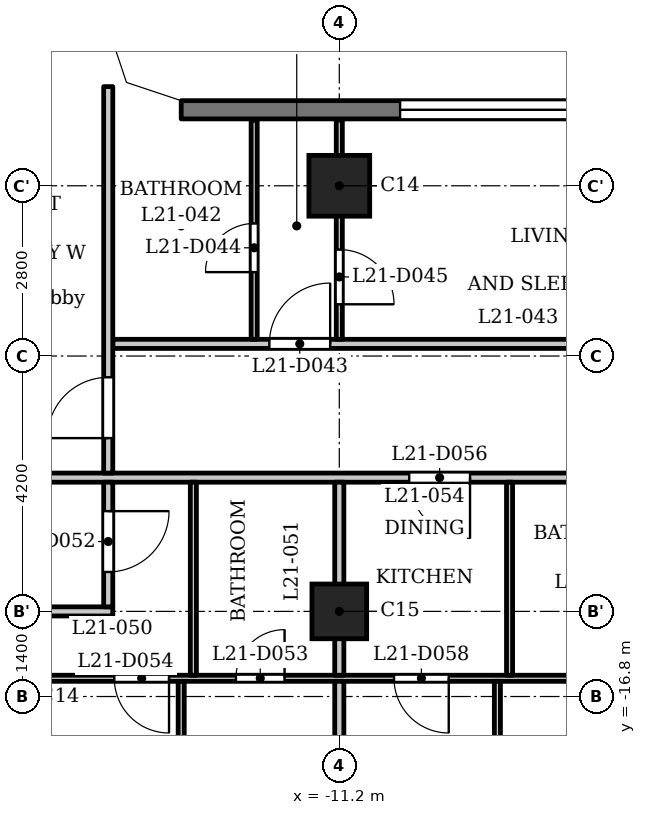
"""IFC4 building model, lengths in metres.
Left out: names, types, materials, properties, quantities, classifications, styles, units other than length and angle.
Written with IfcOpenShell. Run it as: python <this file> out.ifc"""

import sys

from ifc_helpers import new_model, si_unit, direction, frame, frame_2d, origin, origin_2d, place, context, subcontext, project, spatial, polyline, rectangle, outline, extrude, element, fill, save


model = new_model("IFC4")
c1 = context("Model", 3, precision=1e-05, world=origin(), true_north=direction((0.0, 1.0)))
c2 = subcontext(c1, "Body", "Model", "MODEL_VIEW")
j1 = project(units=[si_unit("LENGTHUNIT", "METRE"), si_unit("PLANEANGLEUNIT", "RADIAN")], contexts=[c1])
p1 = place(None, origin())
s1 = spatial("IfcSite", under=j1, at=p1, CompositionType="ELEMENT")
p2 = place(p1, origin())
s2 = spatial("IfcBuilding", under=s1, at=p2, CompositionType="ELEMENT")
p3 = place(p2, frame((0.0, 0.0, 86.8)))
s3 = spatial("IfcBuildingStorey", under=s2, at=p3, CompositionType="ELEMENT", Elevation=86.8)
p4 = place(p3, frame((-11.2, -8.4, 0.0), z_axis=(0.0, 0.0, 1.0), x_axis=(1.0, 0.0, 0.0)))
e1 = element("IfcColumn", 1, at=p4, inside=s3, PredefinedType="COLUMN", context=c2, shape_type="SweptSolid", body=[
    extrude(rectangle(XDim=1.0, YDim=1.0, at=origin_2d()), origin(), (0.0, 0.0, 1.0), 3.5),
])
p5 = place(p3, frame((-11.2, -15.4, 0.0), z_axis=(0.0, 0.0, 1.0), x_axis=(1.0, 0.0, 0.0)))
e2 = element("IfcColumn", 2, at=p5, inside=s3, PredefinedType="COLUMN", context=c2, shape_type="SweptSolid", body=[
    extrude(rectangle(XDim=0.9, YDim=0.9, at=origin_2d()), origin(), (0.0, 0.0, 1.0), 3.5),
])
p6 = place(p3, frame((13.8, -7.15, 0.0), z_axis=(0.0, 0.0, 1.0), x_axis=(-1.0, 0.0, 0.0)))
e3 = element("IfcWall", 3, at=p6, inside=s3, PredefinedType="SOLIDWALL", context=c2, shape_type="SweptSolid", body=[
    extrude(rectangle(XDim=27.6, YDim=0.3, at=frame_2d((13.8, 0.0))), origin(), (0.0, 0.0, 1.0), 3.2),
])
p7 = place(p6, frame((3.6, 0.0, 1.2)))
e4 = element("IfcOpeningElement", 4, at=p7, cuts=e3, PredefinedType="OPENING", context=c2, shape_type="SweptSolid", body=[
    extrude(rectangle(XDim=3.6, YDim=0.95, at=frame_2d((1.8, 0.475))), frame((0.0, 0.16, 0.0), z_axis=(0.0, -1.0, 0.0), x_axis=(1.0, 0.0, 0.0)), (0.0, 0.0, 1.0), 0.32),
])
p8 = place(p6, frame((8.8, 0.0, 0.6)))
e5 = element("IfcOpeningElement", 5, at=p8, cuts=e3, PredefinedType="OPENING", context=c2, shape_type="SweptSolid", body=[
    extrude(rectangle(XDim=1.2, YDim=1.55, at=frame_2d((0.6, 0.775))), frame((0.0, 0.16, 0.0), z_axis=(0.0, -1.0, 0.0), x_axis=(1.0, 0.0, 0.0)), (0.0, 0.0, 1.0), 0.32),
])
p9 = place(p6, frame((11.3, 0.0, 0.9)))
e6 = element("IfcOpeningElement", 6, at=p9, cuts=e3, PredefinedType="OPENING", context=c2, shape_type="SweptSolid", body=[
    extrude(rectangle(XDim=1.8, YDim=1.25, at=frame_2d((0.9, 0.625))), frame((0.0, 0.16, 0.0), z_axis=(0.0, -1.0, 0.0), x_axis=(1.0, 0.0, 0.0)), (0.0, 0.0, 1.0), 0.32),
])
p10 = place(p6, frame((14.8, 0.0, 1.2)))
e7 = element("IfcOpeningElement", 7, at=p10, cuts=e3, PredefinedType="OPENING", context=c2, shape_type="SweptSolid", body=[
    extrude(rectangle(XDim=3.6, YDim=0.95, at=frame_2d((1.8, 0.475))), frame((0.0, 0.16, 0.0), z_axis=(0.0, -1.0, 0.0), x_axis=(1.0, 0.0, 0.0)), (0.0, 0.0, 1.0), 0.32),
])
p11 = place(p6, frame((20.4, 0.0, 1.2)))
e8 = element("IfcOpeningElement", 8, at=p11, cuts=e3, PredefinedType="OPENING", context=c2, shape_type="SweptSolid", body=[
    extrude(rectangle(XDim=3.6, YDim=0.95, at=frame_2d((1.8, 0.475))), frame((0.0, 0.16, 0.0), z_axis=(0.0, -1.0, 0.0), x_axis=(1.0, 0.0, 0.0)), (0.0, 0.0, 1.0), 0.32),
])
p12 = place(p3, frame((-16.725, -16.5, 0.0), z_axis=(0.0, 0.0, 1.0), x_axis=(1.0, 0.0, 0.0)))
e9 = element("IfcWall", 9, at=p12, inside=s3, PredefinedType="PARTITIONING", context=c2, shape_type="SweptSolid", body=[
    extrude(rectangle(XDim=33.45, YDim=0.1, at=frame_2d((16.725, 0.0))), origin(), (0.0, 0.0, 1.0), 3.2),
])
p13 = place(p12, frame((3.825, 0.0, 0.0)))
e10 = element("IfcOpeningElement", 10, at=p13, cuts=e9, PredefinedType="OPENING", context=c2, shape_type="SweptSolid", body=[
    extrude(rectangle(XDim=0.8, YDim=2.1, at=frame_2d((0.4, 1.05))), frame((0.0, 0.06, 0.0), z_axis=(0.0, -1.0, 0.0), x_axis=(1.0, 0.0, 0.0)), (0.0, 0.0, 1.0), 0.12),
])
p14 = place(p12, frame((1.825, 0.0, 0.0)))
e11 = element("IfcOpeningElement", 11, at=p14, cuts=e9, PredefinedType="OPENING", context=c2, shape_type="SweptSolid", body=[
    extrude(rectangle(XDim=0.9, YDim=2.1, at=frame_2d((0.45, 1.05))), frame((0.0, 0.06, 0.0), z_axis=(0.0, -1.0, 0.0), x_axis=(1.0, 0.0, 0.0)), (0.0, 0.0, 1.0), 0.12),
])
p15 = place(p12, frame((9.675, 0.0, 0.0)))
e12 = element("IfcOpeningElement", 12, at=p15, cuts=e9, PredefinedType="OPENING", context=c2, shape_type="SweptSolid", body=[
    extrude(rectangle(XDim=0.8, YDim=2.1, at=frame_2d((0.4, 1.05))), frame((0.0, 0.06, 0.0), z_axis=(0.0, -1.0, 0.0), x_axis=(1.0, 0.0, 0.0)), (0.0, 0.0, 1.0), 0.12),
])
p16 = place(p12, frame((6.425, 0.0, 0.0)))
e13 = element("IfcOpeningElement", 13, at=p16, cuts=e9, PredefinedType="OPENING", context=c2, shape_type="SweptSolid", body=[
    extrude(rectangle(XDim=0.9, YDim=2.1, at=frame_2d((0.45, 1.05))), frame((0.0, 0.06, 0.0), z_axis=(0.0, -1.0, 0.0), x_axis=(1.0, 0.0, 0.0)), (0.0, 0.0, 1.0), 0.12),
])
p17 = place(p12, frame((15.275, 0.0, 0.0)))
e14 = element("IfcOpeningElement", 14, at=p17, cuts=e9, PredefinedType="OPENING", context=c2, shape_type="SweptSolid", body=[
    extrude(rectangle(XDim=0.8, YDim=2.1, at=frame_2d((0.4, 1.05))), frame((0.0, 0.06, 0.0), z_axis=(0.0, -1.0, 0.0), x_axis=(1.0, 0.0, 0.0)), (0.0, 0.0, 1.0), 0.12),
])
p18 = place(p12, frame((12.025, 0.0, 0.0)))
e15 = element("IfcOpeningElement", 15, at=p18, cuts=e9, PredefinedType="OPENING", context=c2, shape_type="SweptSolid", body=[
    extrude(rectangle(XDim=0.9, YDim=2.1, at=frame_2d((0.45, 1.05))), frame((0.0, 0.06, 0.0), z_axis=(0.0, -1.0, 0.0), x_axis=(1.0, 0.0, 0.0)), (0.0, 0.0, 1.0), 0.12),
])
p19 = place(p12, frame((20.875, 0.0, 0.0)))
e16 = element("IfcOpeningElement", 16, at=p19, cuts=e9, PredefinedType="OPENING", context=c2, shape_type="SweptSolid", body=[
    extrude(rectangle(XDim=0.8, YDim=2.1, at=frame_2d((0.4, 1.05))), frame((0.0, 0.06, 0.0), z_axis=(0.0, -1.0, 0.0), x_axis=(1.0, 0.0, 0.0)), (0.0, 0.0, 1.0), 0.12),
])
p20 = place(p12, frame((18.625, 0.0, 0.0)))
e17 = element("IfcOpeningElement", 17, at=p20, cuts=e9, PredefinedType="OPENING", context=c2, shape_type="SweptSolid", body=[
    extrude(rectangle(XDim=0.9, YDim=2.1, at=frame_2d((0.45, 1.05))), frame((0.0, 0.06, 0.0), z_axis=(0.0, -1.0, 0.0), x_axis=(1.0, 0.0, 0.0)), (0.0, 0.0, 1.0), 0.12),
])
p21 = place(p12, frame((23.875, 0.0, 0.0)))
e18 = element("IfcOpeningElement", 18, at=p21, cuts=e9, PredefinedType="OPENING", context=c2, shape_type="SweptSolid", body=[
    extrude(rectangle(XDim=0.8, YDim=2.1, at=frame_2d((0.4, 1.05))), frame((0.0, 0.06, 0.0), z_axis=(0.0, -1.0, 0.0), x_axis=(1.0, 0.0, 0.0)), (0.0, 0.0, 1.0), 0.12),
])
p22 = place(p12, frame((26.225, 0.0, 0.0)))
e19 = element("IfcOpeningElement", 19, at=p22, cuts=e9, PredefinedType="OPENING", context=c2, shape_type="SweptSolid", body=[
    extrude(rectangle(XDim=0.9, YDim=2.1, at=frame_2d((0.45, 1.05))), frame((0.0, 0.06, 0.0), z_axis=(0.0, -1.0, 0.0), x_axis=(1.0, 0.0, 0.0)), (0.0, 0.0, 1.0), 0.12),
])
p23 = place(p12, frame((28.575, 0.0, 0.0)))
e20 = element("IfcOpeningElement", 20, at=p23, cuts=e9, PredefinedType="OPENING", context=c2, shape_type="SweptSolid", body=[
    extrude(rectangle(XDim=0.9, YDim=2.1, at=frame_2d((0.45, 1.05))), frame((0.0, 0.06, 0.0), z_axis=(0.0, -1.0, 0.0), x_axis=(1.0, 0.0, 0.0)), (0.0, 0.0, 1.0), 0.12),
])
p24 = place(p12, frame((30.675, 0.0, 0.0)))
e21 = element("IfcOpeningElement", 21, at=p24, cuts=e9, PredefinedType="OPENING", context=c2, shape_type="SweptSolid", body=[
    extrude(rectangle(XDim=0.9, YDim=2.1, at=frame_2d((0.45, 1.05))), frame((0.0, 0.06, 0.0), z_axis=(0.0, -1.0, 0.0), x_axis=(1.0, 0.0, 0.0)), (0.0, 0.0, 1.0), 0.12),
])
p25 = place(p3, frame((-27.484, -15.4, 0.0), z_axis=(0.0, 0.0, 1.0), x_axis=(1.0, 0.0, 0.0)))
e22 = element("IfcWall", 22, at=p25, inside=s3, PredefinedType="PARTITIONING", context=c2, shape_type="SweptSolid", body=[
    extrude(rectangle(XDim=12.559, YDim=0.15, at=frame_2d((6.279, 0.0))), origin(), (0.0, 0.0, 1.0), 3.2),
])
p26 = place(p25, frame((5.734, 0.0, 0.0)))
e23 = element("IfcOpeningElement", 23, at=p26, cuts=e22, PredefinedType="OPENING", context=c2, shape_type="SweptSolid", body=[
    extrude(rectangle(XDim=1.0, YDim=2.1, at=frame_2d((0.5, 1.05))), frame((0.0, 0.085, 0.0), z_axis=(0.0, -1.0, 0.0), x_axis=(1.0, 0.0, 0.0)), (0.0, 0.0, 1.0), 0.17),
])
p27 = place(p3, frame((-17.4, -13.2, 0.0), z_axis=(0.0, 0.0, 1.0), x_axis=(1.0, 0.0, 0.0)))
e24 = element("IfcWall", 24, at=p27, inside=s3, PredefinedType="PARTITIONING", context=c2, shape_type="SweptSolid", body=[
    extrude(rectangle(XDim=34.8, YDim=0.15, at=frame_2d((17.4, 0.0))), origin(), (0.0, 0.0, 1.0), 3.2),
])
p28 = place(p27, frame((0.15, 0.0, 0.0)))
e25 = element("IfcOpeningElement", 25, at=p28, cuts=e24, PredefinedType="OPENING", context=c2, shape_type="SweptSolid", body=[
    extrude(rectangle(XDim=1.0, YDim=2.1, at=frame_2d((0.5, 1.05))), frame((0.0, 0.085, 0.0), z_axis=(0.0, -1.0, 0.0), x_axis=(1.0, 0.0, 0.0)), (0.0, 0.0, 1.0), 0.17),
])
p29 = place(p27, frame((33.55, 0.0, 0.0)))
e26 = element("IfcOpeningElement", 26, at=p29, cuts=e24, PredefinedType="OPENING", context=c2, shape_type="SweptSolid", body=[
    extrude(rectangle(XDim=1.0, YDim=2.1, at=frame_2d((0.5, 1.05))), frame((0.0, 0.085, 0.0), z_axis=(0.0, -1.0, 0.0), x_axis=(1.0, 0.0, 0.0)), (0.0, 0.0, 1.0), 0.17),
])
p30 = place(p27, frame((7.35, 0.0, 0.0)))
e27 = element("IfcOpeningElement", 27, at=p30, cuts=e24, PredefinedType="OPENING", context=c2, shape_type="SweptSolid", body=[
    extrude(rectangle(XDim=1.0, YDim=2.1, at=frame_2d((0.5, 1.05))), frame((0.0, 0.085, 0.0), z_axis=(0.0, -1.0, 0.0), x_axis=(1.0, 0.0, 0.0)), (0.0, 0.0, 1.0), 0.17),
])
p31 = place(p27, frame((13.7, 0.0, 0.0)))
e28 = element("IfcOpeningElement", 28, at=p31, cuts=e24, PredefinedType="OPENING", context=c2, shape_type="SweptSolid", body=[
    extrude(rectangle(XDim=1.0, YDim=2.1, at=frame_2d((0.5, 1.05))), frame((0.0, 0.085, 0.0), z_axis=(0.0, -1.0, 0.0), x_axis=(1.0, 0.0, 0.0)), (0.0, 0.0, 1.0), 0.17),
])
p32 = place(p27, frame((19.3, 0.0, 0.0)))
e29 = element("IfcOpeningElement", 29, at=p32, cuts=e24, PredefinedType="OPENING", context=c2, shape_type="SweptSolid", body=[
    extrude(rectangle(XDim=1.0, YDim=2.1, at=frame_2d((0.5, 1.05))), frame((0.0, 0.085, 0.0), z_axis=(0.0, -1.0, 0.0), x_axis=(1.0, 0.0, 0.0)), (0.0, 0.0, 1.0), 0.17),
])
p33 = place(p3, frame((-14.925, -11.0, 0.0), z_axis=(0.0, 0.0, 1.0), x_axis=(1.0, 0.0, 0.0)))
e30 = element("IfcWall", 30, at=p33, inside=s3, PredefinedType="PARTITIONING", context=c2, shape_type="SweptSolid", body=[
    extrude(rectangle(XDim=29.85, YDim=0.15, at=frame_2d((14.925, 0.0))), origin(), (0.0, 0.0, 1.0), 3.2),
])
p34 = place(p33, frame((2.575, 0.0, 0.0)))
e31 = element("IfcOpeningElement", 31, at=p34, cuts=e30, PredefinedType="OPENING", context=c2, shape_type="SweptSolid", body=[
    extrude(rectangle(XDim=1.0, YDim=2.1, at=frame_2d((0.5, 1.05))), frame((0.0, 0.085, 0.0), z_axis=(0.0, -1.0, 0.0), x_axis=(1.0, 0.0, 0.0)), (0.0, 0.0, 1.0), 0.17),
])
p35 = place(p33, frame((15.475, 0.0, 0.0)))
e32 = element("IfcOpeningElement", 32, at=p35, cuts=e30, PredefinedType="OPENING", context=c2, shape_type="SweptSolid", body=[
    extrude(rectangle(XDim=1.0, YDim=2.1, at=frame_2d((0.5, 1.05))), frame((0.0, 0.085, 0.0), z_axis=(0.0, -1.0, 0.0), x_axis=(1.0, 0.0, 0.0)), (0.0, 0.0, 1.0), 0.17),
])
p36 = place(p33, frame((26.375, 0.0, 0.0)))
e33 = element("IfcOpeningElement", 33, at=p36, cuts=e30, PredefinedType="OPENING", context=c2, shape_type="SweptSolid", body=[
    extrude(rectangle(XDim=1.0, YDim=2.1, at=frame_2d((0.5, 1.05))), frame((0.0, 0.085, 0.0), z_axis=(0.0, -1.0, 0.0), x_axis=(1.0, 0.0, 0.0)), (0.0, 0.0, 1.0), 0.17),
])
p37 = place(p3, frame((-15.0, -15.325, 0.0), z_axis=(0.0, 0.0, 1.0), x_axis=(0.0, 1.0, 0.0)))
e34 = element("IfcWall", 34, at=p37, inside=s3, PredefinedType="PARTITIONING", context=c2, shape_type="SweptSolid", body=[
    extrude(rectangle(XDim=2.05, YDim=0.15, at=frame_2d((1.025, 0.0))), origin(), (0.0, 0.0, 1.0), 3.2),
])
p38 = place(p37, frame((0.574, 0.0, 0.0)))
e35 = element("IfcOpeningElement", 35, at=p38, cuts=e34, PredefinedType="OPENING", context=c2, shape_type="SweptSolid", body=[
    extrude(rectangle(XDim=1.0, YDim=2.1, at=frame_2d((0.5, 1.05))), frame((0.0, 0.085, 0.0), z_axis=(0.0, -1.0, 0.0), x_axis=(1.0, 0.0, 0.0)), (0.0, 0.0, 1.0), 0.17),
])
p39 = place(p3, frame((-15.0, -13.125, 0.0), z_axis=(0.0, 0.0, 1.0), x_axis=(0.0, 1.0, 0.0)))
e36 = element("IfcWall", 36, at=p39, inside=s3, PredefinedType="PARTITIONING", context=c2, shape_type="SweptSolid", body=[
    extrude(rectangle(XDim=6.356, YDim=0.15, at=frame_2d((3.178, 0.0))), origin(), (0.0, 0.0, 1.0), 3.2),
])
p40 = place(p39, frame((0.575, 0.0, 0.0)))
e37 = element("IfcOpeningElement", 37, at=p40, cuts=e36, PredefinedType="OPENING", context=c2, shape_type="SweptSolid", body=[
    extrude(rectangle(XDim=1.0, YDim=2.1, at=frame_2d((0.5, 1.05))), frame((0.0, 0.085, 0.0), z_axis=(0.0, -1.0, 0.0), x_axis=(1.0, 0.0, 0.0)), (0.0, 0.0, 1.0), 0.17),
])
p41 = place(p3, frame((-13.8, -22.08, 0.0), z_axis=(0.0, 0.0, 1.0), x_axis=(0.0, 1.0, 0.0)))
e38 = element("IfcWall", 38, at=p41, inside=s3, PredefinedType="PARTITIONING", context=c2, shape_type="SweptSolid", body=[
    extrude(rectangle(XDim=5.53, YDim=0.1, at=frame_2d((2.765, 0.0))), origin(), (0.0, 0.0, 1.0), 3.2),
])
p42 = place(p41, frame((0.42, 0.0, 0.0)))
e39 = element("IfcOpeningElement", 39, at=p42, cuts=e38, PredefinedType="OPENING", context=c2, shape_type="SweptSolid", body=[
    extrude(rectangle(XDim=0.9, YDim=2.1, at=frame_2d((0.45, 1.05))), frame((0.0, 0.06, 0.0), z_axis=(0.0, -1.0, 0.0), x_axis=(1.0, 0.0, 0.0)), (0.0, 0.0, 1.0), 0.12),
])
p43 = place(p3, frame((-13.6, -16.45, 0.0), z_axis=(0.0, 0.0, 1.0), x_axis=(0.0, 1.0, 0.0)))
e40 = element("IfcWall", 40, at=p43, inside=s3, PredefinedType="PARTITIONING", context=c2, shape_type="SweptSolid", body=[
    extrude(rectangle(XDim=3.175, YDim=0.1, at=frame_2d((1.587, 0.0))), origin(), (0.0, 0.0, 1.0), 3.2),
])
p44 = place(p3, frame((-12.6, -10.925, 0.0), z_axis=(0.0, 0.0, 1.0), x_axis=(0.0, 1.0, 0.0)))
e41 = element("IfcWall", 41, at=p44, inside=s3, PredefinedType="PARTITIONING", context=c2, shape_type="SweptSolid", body=[
    extrude(rectangle(XDim=3.605, YDim=0.1, at=frame_2d((1.802, 0.0))), origin(), (0.0, 0.0, 1.0), 3.2),
])
p45 = place(p44, frame((1.105, 0.0, 0.0)))
e42 = element("IfcOpeningElement", 42, at=p45, cuts=e41, PredefinedType="OPENING", context=c2, shape_type="SweptSolid", body=[
    extrude(rectangle(XDim=0.8, YDim=2.1, at=frame_2d((0.4, 1.05))), frame((0.0, 0.06, 0.0), z_axis=(0.0, -1.0, 0.0), x_axis=(1.0, 0.0, 0.0)), (0.0, 0.0, 1.0), 0.12),
])
p46 = place(p3, frame((-11.2, -10.925, 0.0), z_axis=(0.0, 0.0, 1.0), x_axis=(0.0, 1.0, 0.0)))
e43 = element("IfcWall", 43, at=p46, inside=s3, PredefinedType="PARTITIONING", context=c2, shape_type="SweptSolid", body=[
    extrude(rectangle(XDim=3.605, YDim=0.1, at=frame_2d((1.802, 0.0))), origin(), (0.0, 0.0, 1.0), 3.2),
])
p47 = place(p46, frame((0.576, 0.0, 0.0)))
e44 = element("IfcOpeningElement", 44, at=p47, cuts=e43, PredefinedType="OPENING", context=c2, shape_type="SweptSolid", body=[
    extrude(rectangle(XDim=0.9, YDim=2.1, at=frame_2d((0.45, 1.05))), frame((0.0, 0.06, 0.0), z_axis=(0.0, -1.0, 0.0), x_axis=(1.0, 0.0, 0.0)), (0.0, 0.0, 1.0), 0.12),
])
p48 = place(p3, frame((-11.2, -23.03, 0.0), z_axis=(0.0, 0.0, 1.0), x_axis=(0.0, 1.0, 0.0)))
e45 = element("IfcWall", 45, at=p48, inside=s3, PredefinedType="PARTITIONING", context=c2, shape_type="SweptSolid", body=[
    extrude(rectangle(XDim=6.48, YDim=0.15, at=frame_2d((3.24, 0.0))), origin(), (0.0, 0.0, 1.0), 3.2),
])
p49 = place(p3, frame((-11.2, -16.45, 0.0), z_axis=(0.0, 0.0, 1.0), x_axis=(0.0, 1.0, 0.0)))
e46 = element("IfcWall", 46, at=p49, inside=s3, PredefinedType="PARTITIONING", context=c2, shape_type="SweptSolid", body=[
    extrude(rectangle(XDim=3.175, YDim=0.15, at=frame_2d((1.587, 0.0))), origin(), (0.0, 0.0, 1.0), 3.2),
])
p50 = place(p3, frame((-8.6, -22.08, 0.0), z_axis=(0.0, 0.0, 1.0), x_axis=(0.0, 1.0, 0.0)))
e47 = element("IfcWall", 47, at=p50, inside=s3, PredefinedType="PARTITIONING", context=c2, shape_type="SweptSolid", body=[
    extrude(rectangle(XDim=5.53, YDim=0.1, at=frame_2d((2.765, 0.0))), origin(), (0.0, 0.0, 1.0), 3.2),
])
p51 = place(p50, frame((0.42, 0.0, 0.0)))
e48 = element("IfcOpeningElement", 48, at=p51, cuts=e47, PredefinedType="OPENING", context=c2, shape_type="SweptSolid", body=[
    extrude(rectangle(XDim=0.9, YDim=2.1, at=frame_2d((0.45, 1.05))), frame((0.0, 0.06, 0.0), z_axis=(0.0, -1.0, 0.0), x_axis=(1.0, 0.0, 0.0)), (0.0, 0.0, 1.0), 0.12),
])
p52 = place(p3, frame((-8.4, -16.45, 0.0), z_axis=(0.0, 0.0, 1.0), x_axis=(0.0, 1.0, 0.0)))
e49 = element("IfcWall", 49, at=p52, inside=s3, PredefinedType="PARTITIONING", context=c2, shape_type="SweptSolid", body=[
    extrude(rectangle(XDim=3.175, YDim=0.1, at=frame_2d((1.587, 0.0))), origin(), (0.0, 0.0, 1.0), 3.2),
])
p53 = place(p3, origin())
e50 = element("IfcWall", 50, at=p53, inside=s3, PredefinedType="SOLIDWALL", context=c2, shape_type="SweptSolid", body=[
    extrude(outline(polyline([(-14.937, -6.937), (-13.849, -7.3), (-13.8, -7.3), (-13.8, -7.0), (-14.7, -6.7), (-15.0, -5.8), (-15.3, -5.8), (-15.3, -5.849), (-14.937, -6.937)])), origin(), (0.0, 0.0, 1.0), 3.2),
])
p54 = place(p40, origin())
e51 = element("IfcDoor", 51, at=p54, inside=s3, OperationType="SINGLE_SWING_RIGHT", PredefinedType="DOOR", context=c2, shape_type="SweptSolid", body=[
    extrude(rectangle(XDim=1.0, YDim=2.1, at=frame_2d((0.5, 1.05))), frame((0.0, 0.025, 0.0), z_axis=(0.0, -1.0, 0.0), x_axis=(1.0, 0.0, 0.0)), (0.0, 0.0, 1.0), 0.05),
])
fill(e37, e51)
p55 = place(p34, origin())
e52 = element("IfcDoor", 52, at=p55, inside=s3, OperationType="SINGLE_SWING_LEFT", PredefinedType="DOOR", context=c2, shape_type="SweptSolid", body=[
    extrude(rectangle(XDim=1.0, YDim=2.1, at=frame_2d((0.5, 1.05))), frame((0.0, 0.025, 0.0), z_axis=(0.0, -1.0, 0.0), x_axis=(1.0, 0.0, 0.0)), (0.0, 0.0, 1.0), 0.05),
])
fill(e31, e52)
p56 = place(p45, origin())
e53 = element("IfcDoor", 53, at=p56, inside=s3, OperationType="SINGLE_SWING_RIGHT", PredefinedType="DOOR", context=c2, shape_type="SweptSolid", body=[
    extrude(rectangle(XDim=0.8, YDim=2.1, at=frame_2d((0.4, 1.05))), frame((0.0, 0.025, 0.0), z_axis=(0.0, -1.0, 0.0), x_axis=(1.0, 0.0, 0.0)), (0.0, 0.0, 1.0), 0.05),
])
fill(e42, e53)
p57 = place(p47, origin())
e54 = element("IfcDoor", 54, at=p57, inside=s3, OperationType="SINGLE_SWING_LEFT", PredefinedType="DOOR", context=c2, shape_type="SweptSolid", body=[
    extrude(rectangle(XDim=0.9, YDim=2.1, at=frame_2d((0.45, 1.05))), frame((0.0, 0.025, 0.0), z_axis=(0.0, -1.0, 0.0), x_axis=(1.0, 0.0, 0.0)), (0.0, 0.0, 1.0), 0.05),
])
fill(e44, e54)
p58 = place(p38, origin())
e55 = element("IfcDoor", 55, at=p58, inside=s3, OperationType="SINGLE_SWING_RIGHT", PredefinedType="DOOR", context=c2, shape_type="SweptSolid", body=[
    extrude(rectangle(XDim=1.0, YDim=2.1, at=frame_2d((0.5, 1.05))), frame((0.0, 0.025, 0.0), z_axis=(0.0, -1.0, 0.0), x_axis=(1.0, 0.0, 0.0)), (0.0, 0.0, 1.0), 0.05),
])
fill(e35, e55)
p59 = place(p13, origin())
e56 = element("IfcDoor", 56, at=p59, inside=s3, OperationType="SINGLE_SWING_LEFT", PredefinedType="DOOR", context=c2, shape_type="SweptSolid", body=[
    extrude(rectangle(XDim=0.8, YDim=2.1, at=frame_2d((0.4, 1.05))), frame((0.0, 0.025, 0.0), z_axis=(0.0, -1.0, 0.0), x_axis=(1.0, 0.0, 0.0)), (0.0, 0.0, 1.0), 0.05),
])
fill(e10, e56)
p60 = place(p14, origin())
e57 = element("IfcDoor", 57, at=p60, inside=s3, OperationType="SINGLE_SWING_RIGHT", PredefinedType="DOOR", context=c2, shape_type="SweptSolid", body=[
    extrude(rectangle(XDim=0.9, YDim=2.1, at=frame_2d((0.45, 1.05))), frame((0.0, 0.025, 0.0), z_axis=(0.0, -1.0, 0.0), x_axis=(1.0, 0.0, 0.0)), (0.0, 0.0, 1.0), 0.05),
])
fill(e11, e57)
p61 = place(p30, origin())
e58 = element("IfcDoor", 58, at=p61, inside=s3, OperationType="SINGLE_SWING_RIGHT", PredefinedType="DOOR", context=c2, shape_type="SweptSolid", body=[
    extrude(rectangle(XDim=1.0, YDim=2.1, at=frame_2d((0.5, 1.05))), frame((0.0, 0.025, 0.0), z_axis=(0.0, -1.0, 0.0), x_axis=(1.0, 0.0, 0.0)), (0.0, 0.0, 1.0), 0.05),
])
fill(e27, e58)
p62 = place(p16, origin())
e59 = element("IfcDoor", 59, at=p62, inside=s3, OperationType="SINGLE_SWING_RIGHT", PredefinedType="DOOR", context=c2, shape_type="SweptSolid", body=[
    extrude(rectangle(XDim=0.9, YDim=2.1, at=frame_2d((0.45, 1.05))), frame((0.0, 0.025, 0.0), z_axis=(0.0, -1.0, 0.0), x_axis=(1.0, 0.0, 0.0)), (0.0, 0.0, 1.0), 0.05),
])
fill(e13, e59)
p63 = place(p11, origin())
e60 = element("IfcWindow", 60, at=p63, inside=s3, PartitioningType="SINGLE_PANEL", PredefinedType="WINDOW", context=c2, shape_type="SweptSolid", body=[
    extrude(rectangle(XDim=3.6, YDim=0.95, at=frame_2d((1.8, 0.475))), frame((0.0, 0.03, 0.0), z_axis=(0.0, -1.0, 0.0), x_axis=(1.0, 0.0, 0.0)), (0.0, 0.0, 1.0), 0.06),
])
fill(e8, e60)
save(model, sys.argv[1])
